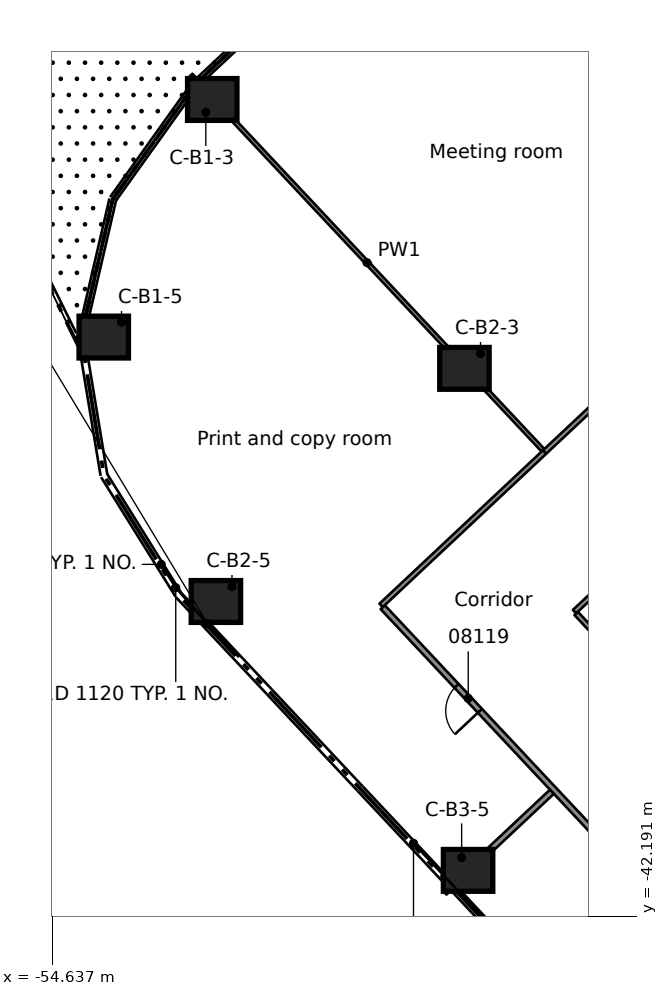
"""IFC4 building model, lengths in metres.
Left out: names, types, materials, properties, quantities, classifications, styles, units other than length and angle.
Written with IfcOpenShell. Run it as: python <this file> out.ifc"""

import sys

from ifc_helpers import new_model, si_unit, direction, frame, frame_2d, origin, origin_2d, place, context, subcontext, project, spatial, rectangle, extrude, element, fill, save


model = new_model("IFC4")
c1 = context("Model", 3, precision=1e-05, world=origin(), true_north=direction((0.0, 1.0)))
c2 = subcontext(c1, "Body", "Model", "MODEL_VIEW")
j1 = project(units=[si_unit("LENGTHUNIT", "METRE"), si_unit("PLANEANGLEUNIT", "RADIAN")], contexts=[c1])
p1 = place(None, origin())
s1 = spatial("IfcSite", under=j1, at=p1, CompositionType="ELEMENT")
p2 = place(p1, origin())
s2 = spatial("IfcBuilding", under=s1, at=p2, CompositionType="ELEMENT")
p3 = place(p2, frame((0.0, 0.0, 37.3)))
s3 = spatial("IfcBuildingStorey", under=s2, at=p3, CompositionType="ELEMENT", Elevation=37.3)
for number, where, z_axis, x_axis in (
    (1, (-50.421, -20.695, 0.0), (0.0, 0.0, 1.0), (1.0, 0.0, 0.0)),
    (2, (-53.276, -26.947, 0.0), (0.0, 0.0, 1.0), (1.0, 0.0, 0.0)),
    (3, (-43.785, -27.77, 0.0), (0.0, 0.0, 1.0), (1.0, 0.0, 0.0)),
    (4, (-50.325, -33.904, 0.0), (0.0, 0.0, 1.0), (1.0, 0.0, 0.0)),
    (5, (-43.689, -40.979, 0.0), (0.0, 0.0, 1.0), (1.0, 0.0, 0.0)),
):
    element("IfcColumn", number, at=place(p3, frame(where, z_axis=z_axis, x_axis=x_axis)), inside=s3, PredefinedType="COLUMN", context=c2, shape_type="SweptSolid", body=[
        extrude(rectangle(XDim=1.3, YDim=1.1, at=origin_2d()), origin(), (0.0, 0.0, 1.0), 3.5),
    ])
p4 = place(p3, frame((-36.93, -43.655, 0.0), z_axis=(0.0, 0.0, 1.0), x_axis=(-0.684107687407, 0.72938101979, 0.0)))
e6 = element("IfcWall", 6, at=p4, inside=s3, PredefinedType="PARTITIONING", context=c2, shape_type="SweptSolid", body=[
    extrude(rectangle(XDim=13.163, YDim=0.15, at=frame_2d((6.582, 0.0))), origin(), (0.0, 0.0, 1.0), 3.06),
])
p5 = place(p4, frame((2.775, 0.0, 0.0)))
e7 = element("IfcOpeningElement", 7, at=p5, cuts=e6, PredefinedType="OPENING", context=c2, shape_type="SweptSolid", body=[
    extrude(rectangle(XDim=0.9, YDim=2.1, at=frame_2d((0.45, 1.05))), frame((0.0, 0.085, 0.0), z_axis=(0.0, -1.0, 0.0), x_axis=(1.0, 0.0, 0.0)), (0.0, 0.0, 1.0), 0.17),
])
p6 = place(p4, frame((9.425, 0.0, 0.0)))
e8 = element("IfcOpeningElement", 8, at=p6, cuts=e6, PredefinedType="OPENING", context=c2, shape_type="SweptSolid", body=[
    extrude(rectangle(XDim=0.9, YDim=2.1, at=frame_2d((0.45, 1.05))), frame((0.0, 0.085, 0.0), z_axis=(0.0, -1.0, 0.0), x_axis=(1.0, 0.0, 0.0)), (0.0, 0.0, 1.0), 0.17),
])
p7 = place(p3, frame((-40.845, -34.218, 0.0), z_axis=(0.0, 0.0, 1.0), x_axis=(0.683941128881, -0.72953720414, 0.0)))
e9 = element("IfcWall", 9, at=p7, inside=s3, PredefinedType="PARTITIONING", context=c2, shape_type="SweptSolid", body=[
    extrude(rectangle(XDim=2.393, YDim=0.125, at=frame_2d((1.197, 0.0))), origin(), (0.0, 0.0, 1.0), 3.06),
])
p8 = place(p3, frame((-50.979, -20.052, 0.0), z_axis=(0.0, 0.0, 1.0), x_axis=(0.684137881392, -0.729352698798, 0.0)))
e10 = element("IfcWall", 10, at=p8, inside=s3, PredefinedType="PARTITIONING", context=c2, shape_type="SweptSolid", body=[
    extrude(rectangle(XDim=13.537, YDim=0.1, at=frame_2d((6.768, 0.0))), origin(), (0.0, 0.0, 1.0), 3.06),
])
p9 = place(p3, frame((-44.487, -13.963, 0.0), z_axis=(0.0, 0.0, 1.0), x_axis=(0.684099502381, -0.729388696678, 0.0)))
e11 = element("IfcWall", 11, at=p9, inside=s3, PredefinedType="PARTITIONING", context=c2, shape_type="SweptSolid", body=[
    extrude(rectangle(XDim=13.536, YDim=0.1, at=frame_2d((6.768, 0.0))), origin(), (0.0, 0.0, 1.0), 3.06),
])
p10 = place(p3, frame((-40.888, -34.17, 0.0), z_axis=(0.0, 0.0, 1.0), x_axis=(0.729573637745, 0.683902264295, 0.0)))
e12 = element("IfcWall", 12, at=p10, inside=s3, PredefinedType="PARTITIONING", context=c2, shape_type="SweptSolid", body=[
    extrude(rectangle(XDim=2.299, YDim=0.125, at=frame_2d((1.149, 0.0))), origin(), (0.0, 0.0, 1.0), 3.06),
])
p11 = place(p3, frame((-44.309, -41.561, 0.0), z_axis=(0.0, 0.0, 1.0), x_axis=(0.729332834695, 0.684159057702, 0.0)))
e13 = element("IfcWall", 13, at=p11, inside=s3, PredefinedType="PARTITIONING", context=c2, shape_type="SweptSolid", body=[
    extrude(rectangle(XDim=3.875, YDim=0.15, at=frame_2d((1.938, 0.0))), origin(), (0.0, 0.0, 1.0), 3.06),
])
p12 = place(p3, frame((-45.978, -34.007, 0.0), z_axis=(0.0, 0.0, 1.0), x_axis=(0.72936038077, 0.684129691625, 0.0)))
e14 = element("IfcWall", 14, at=p12, inside=s3, PredefinedType="PARTITIONING", context=c2, shape_type="SweptSolid", body=[
    extrude(rectangle(XDim=5.9, YDim=0.125, at=frame_2d((2.95, 0.0))), origin(), (0.0, 0.0, 1.0), 3.06),
])
p13 = place(p3, frame((-41.675, -29.971, 0.0), z_axis=(0.0, 0.0, 1.0), x_axis=(0.729357568135, 0.684132690203, 0.0)))
e15 = element("IfcWall", 15, at=p13, inside=s3, PredefinedType="PARTITIONING", context=c2, shape_type="SweptSolid", body=[
    extrude(rectangle(XDim=18.354, YDim=0.125, at=frame_2d((9.177, 0.0))), origin(), (0.0, 0.0, 1.0), 3.06),
])
p14 = place(p13, frame((13.408, 0.0, 0.0)))
e16 = element("IfcOpeningElement", 16, at=p14, cuts=e15, PredefinedType="OPENING", context=c2, shape_type="SweptSolid", body=[
    extrude(rectangle(XDim=1.8, YDim=2.1, at=frame_2d((0.9, 1.05))), frame((0.0, 0.073, 0.0), z_axis=(0.0, -1.0, 0.0), x_axis=(1.0, 0.0, 0.0)), (0.0, 0.0, 1.0), 0.145),
])
p15 = place(p13, frame((4.1, 0.0, 0.0)))
e17 = element("IfcOpeningElement", 17, at=p15, cuts=e15, PredefinedType="OPENING", context=c2, shape_type="SweptSolid", body=[
    extrude(rectangle(XDim=0.9, YDim=2.1, at=frame_2d((0.45, 1.05))), frame((0.0, 0.073, 0.0), z_axis=(0.0, -1.0, 0.0), x_axis=(1.0, 0.0, 0.0)), (0.0, 0.0, 1.0), 0.145),
])
p16 = place(p6, origin())
e18 = element("IfcDoor", 18, at=p16, inside=s3, OperationType="SINGLE_SWING_RIGHT", PredefinedType="DOOR", context=c2, shape_type="SweptSolid", body=[
    extrude(rectangle(XDim=0.9, YDim=2.1, at=frame_2d((0.45, 1.05))), frame((0.0, 0.025, 0.0), z_axis=(0.0, -1.0, 0.0), x_axis=(1.0, 0.0, 0.0)), (0.0, 0.0, 1.0), 0.05),
])
fill(e8, e18)
save(model, sys.argv[1])
